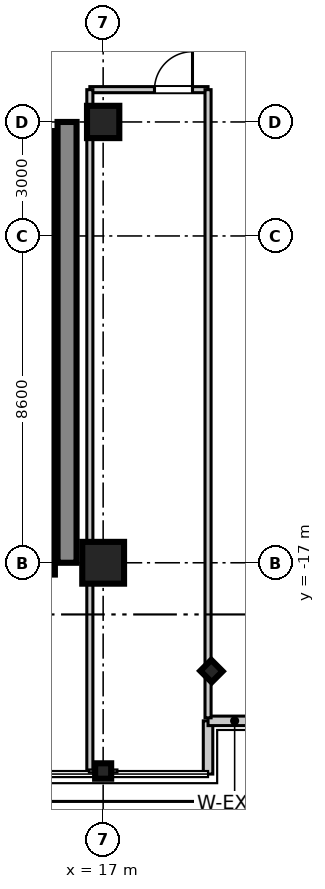
"""IFC4 building model, lengths in metres.
Left out: names, types, materials, properties, quantities, classifications, styles, units other than length and angle.
Written with IfcOpenShell. Run it as: python <this file> out.ifc"""

import sys

from ifc_helpers import new_model, si_unit, direction, frame, frame_2d, origin, origin_2d, place, context, subcontext, project, spatial, rectangle, i_section, extrude, source, transform, mapped, element, fill, save


model = new_model("IFC4")
c1 = context("Model", 3, precision=1e-05, world=origin(), true_north=direction((0.0, 1.0)))
c2 = subcontext(c1, "Body", "Model", "MODEL_VIEW")
j1 = project(units=[si_unit("LENGTHUNIT", "METRE"), si_unit("PLANEANGLEUNIT", "RADIAN")], contexts=[c1])
p1 = place(None, origin())
s1 = spatial("IfcSite", under=j1, at=p1, CompositionType="ELEMENT")
p2 = place(p1, origin())
s2 = spatial("IfcBuilding", under=s1, at=p2, CompositionType="ELEMENT")
p3 = place(p2, frame((0.0, 0.0, 149.0)))
s3 = spatial("IfcBuildingStorey", under=s2, at=p3, CompositionType="ELEMENT", Elevation=149.0)
m1 = source(origin(), c2, "Body", "SweptSolid", [
    extrude(rectangle(XDim=1.1, YDim=1.1, at=origin_2d()), origin(), (0.0, 0.0, 1.0), 3.605),
])
p4 = place(p3, frame((17.0, -17.0, 0.0), z_axis=(0.0, 0.0, 1.0), x_axis=(1.0, 0.0, 0.0)))
e1 = element("IfcColumn", 1, at=p4, inside=s3, PredefinedType="COLUMN", context=c2, shape_type="MappedRepresentation", body=[
    mapped(m1, transform((0.0, 0.0, 0.0), scale=1.0)),
])
m2 = source(origin(), c2, "Body", "SweptSolid", [
    extrude(rectangle(XDim=0.85, YDim=0.85, at=origin_2d()), origin(), (0.0, 0.0, 1.0), 3.605),
])
p5 = place(p3, frame((17.0, -5.4, 0.0), z_axis=(0.0, 0.0, 1.0), x_axis=(1.0, 0.0, 0.0)))
e2 = element("IfcColumn", 2, at=p5, inside=s3, PredefinedType="PILASTER", context=c2, shape_type="MappedRepresentation", body=[
    mapped(m2, transform((0.0, 0.0, 0.0), scale=1.0)),
])
m3 = source(origin(), c2, "Body", "SweptSolid", [
    extrude(i_section(OverallWidth=0.406, OverallDepth=0.422, WebThickness=0.019, FlangeThickness=0.03, at=origin_2d()), origin(), (0.0, 0.0, 1.0), 3.605),
])
for number, where, z_axis, x_axis in (
    (3, (17.0, -22.48, 0.0), (0.0, 0.0, 1.0), (0.0, 1.0, 0.0)),
    (4, (19.85, -19.85, 0.0), (0.0, 0.0, 1.0), (0.707, 0.707, 0.0)),
):
    element("IfcColumn", number, at=place(p3, frame(where, z_axis=z_axis, x_axis=x_axis)), inside=s3, PredefinedType="COLUMN", context=c2, shape_type="MappedRepresentation", body=[
        mapped(m3, transform((0.0, 0.0, 0.0), scale=1.0)),
    ])
m4 = source(origin(), c2, "Body", "SweptSolid", [
    extrude(rectangle(XDim=11.6, YDim=0.5, at=frame_2d((5.8, 0.0))), origin(), (0.0, 0.0, 1.0), 3.39),
])
p6 = place(p3, frame((16.05, -17.0, 0.0), z_axis=(0.0, 0.0, 1.0), x_axis=(0.0, 1.0, 0.0)))
e5 = element("IfcWall", 5, at=p6, inside=s3, PredefinedType="SHEAR", context=c2, shape_type="MappedRepresentation", body=[
    mapped(m4, transform((0.0, 0.0, 0.0), scale=1.0)),
])
m5 = source(origin(), c2, "Body", "SweptSolid", [
    extrude(rectangle(XDim=2.36, YDim=0.22, at=frame_2d((1.18, 0.0))), origin(), (0.0, 0.0, 1.0), 3.39),
])
p7 = place(p3, frame((15.62, -8.0, 0.0), z_axis=(0.0, 0.0, 1.0), x_axis=(0.0, 1.0, 0.0)))
e6 = element("IfcWall", 6, at=p7, inside=s3, PredefinedType="SHEAR", context=c2, shape_type="MappedRepresentation", body=[
    mapped(m5, transform((0.0, 0.0, 0.0), scale=1.0)),
])
m6 = source(origin(), c2, "Body", "SweptSolid", [
    extrude(rectangle(XDim=2.2, YDim=0.22, at=frame_2d((1.1, 0.0))), origin(), (0.0, 0.0, 1.0), 3.39),
])
for number, where, z_axis, x_axis in (
    (7, (15.62, -10.2, 0.0), (0.0, 0.0, 1.0), (0.0, 1.0, 0.0)),
    (8, (15.62, -12.4, 0.0), (0.0, 0.0, 1.0), (0.0, 1.0, 0.0)),
):
    element("IfcWall", number, at=place(p3, frame(where, z_axis=z_axis, x_axis=x_axis)), inside=s3, PredefinedType="SHEAR", context=c2, shape_type="MappedRepresentation", body=[
        mapped(m6, transform((0.0, 0.0, 0.0), scale=1.0)),
    ])
m7 = source(origin(), c2, "Body", "SweptSolid", [
    extrude(rectangle(XDim=2.3, YDim=0.22, at=frame_2d((1.15, 0.0))), origin(), (0.0, 0.0, 1.0), 3.39),
])
p8 = place(p3, frame((15.62, -14.7, 0.0), z_axis=(0.0, 0.0, 1.0), x_axis=(0.0, 1.0, 0.0)))
e9 = element("IfcWall", 9, at=p8, inside=s3, PredefinedType="SHEAR", context=c2, shape_type="MappedRepresentation", body=[
    mapped(m7, transform((0.0, 0.0, 0.0), scale=1.0)),
])
m8 = source(origin(), c2, "Body", "SweptSolid", [
    extrude(rectangle(XDim=2.61, YDim=0.22, at=frame_2d((1.305, 0.0))), origin(), (0.0, 0.0, 1.0), 3.39),
])
p9 = place(p3, frame((15.62, -17.31, 0.0), z_axis=(0.0, 0.0, 1.0), x_axis=(0.0, 1.0, 0.0)))
e10 = element("IfcWall", 10, at=p9, inside=s3, PredefinedType="SHEAR", context=c2, shape_type="MappedRepresentation", body=[
    mapped(m8, transform((0.0, 0.0, 0.0), scale=1.0)),
])
m9 = source(origin(), c2, "Body", "SweptSolid", [
    extrude(rectangle(XDim=1.4, YDim=0.25, at=frame_2d((0.7, 0.0))), origin(), (0.0, 0.0, 1.0), 3.39),
])
p10 = place(p3, frame((19.76, -22.56, 0.0), z_axis=(0.0, 0.0, 1.0), x_axis=(0.0, 1.0, 0.0)))
e11 = element("IfcWall", 11, at=p10, inside=s3, PredefinedType="STANDARD", context=c2, shape_type="MappedRepresentation", body=[
    mapped(m9, transform((0.0, 0.0, 0.0), scale=1.0)),
])
m10 = source(origin(), c2, "Body", "SweptSolid", [
    extrude(rectangle(XDim=1.4, YDim=0.25, at=frame_2d((0.7, 0.0))), origin(), (0.0, 0.0, 1.0), 3.39),
])
p11 = place(p3, frame((19.76, -21.16, 0.0), z_axis=(0.0, 0.0, 1.0), x_axis=(1.0, 0.0, 0.0)))
e12 = element("IfcWall", 12, at=p11, inside=s3, PredefinedType="STANDARD", context=c2, shape_type="MappedRepresentation", body=[
    mapped(m10, transform((0.0, 0.0, 0.0), scale=1.0)),
])
m11 = source(origin(), c2, "Body", "SweptSolid", [
    extrude(rectangle(XDim=3.11, YDim=0.16, at=frame_2d((1.555, 0.0))), origin(), (0.0, 0.0, 1.0), 2.73),
])
p12 = place(p3, frame((16.65, -4.55, 0.0), z_axis=(0.0, 0.0, 1.0), x_axis=(1.0, 0.0, 0.0)))
e13 = element("IfcWall", 13, at=p12, inside=s3, PredefinedType="PARTITIONING", context=c2, shape_type="MappedRepresentation", body=[
    mapped(m11, transform((0.0, 0.0, 0.0), scale=1.0)),
])
p13 = place(p12, frame((1.701, 0.0, 0.0)))
e14 = element("IfcOpeningElement", 14, at=p13, cuts=e13, PredefinedType="OPENING", context=c2, shape_type="SweptSolid", body=[
    extrude(rectangle(XDim=1.0, YDim=2.1, at=frame_2d((0.5, 1.05))), frame((0.0, 0.09, 0.0), z_axis=(0.0, -1.0, 0.0), x_axis=(1.0, 0.0, 0.0)), (0.0, 0.0, 1.0), 0.18),
])
m12 = source(origin(), c2, "Body", "SweptSolid", [
    extrude(rectangle(XDim=17.95, YDim=0.16, at=frame_2d((8.975, 0.0))), origin(), (0.0, 0.0, 1.0), 2.73),
])
p14 = place(p3, frame((16.65, -22.5, 0.0), z_axis=(0.0, 0.0, 1.0), x_axis=(0.0, 1.0, 0.0)))
e15 = element("IfcWall", 15, at=p14, inside=s3, PredefinedType="PARTITIONING", context=c2, shape_type="MappedRepresentation", body=[
    mapped(m12, transform((0.0, 0.0, 0.0), scale=1.0)),
])
m13 = source(origin(), c2, "Body", "SweptSolid", [
    extrude(rectangle(XDim=16.53, YDim=0.16, at=frame_2d((8.265, 0.0))), origin(), (0.0, 0.0, 1.0), 2.73),
])
p15 = place(p3, frame((19.76, -21.08, 0.0), z_axis=(0.0, 0.0, 1.0), x_axis=(0.0, 1.0, 0.0)))
e16 = element("IfcWall", 16, at=p15, inside=s3, PredefinedType="PARTITIONING", context=c2, shape_type="MappedRepresentation", body=[
    mapped(m13, transform((0.0, 0.0, 0.0), scale=1.0)),
])
m14 = source(origin(), c2, "Body", "SweptSolid", [
    extrude(rectangle(XDim=1.0, YDim=2.1, at=frame_2d((0.5, 1.05))), frame((0.0, 0.025, 0.0), z_axis=(0.0, -1.0, 0.0), x_axis=(1.0, 0.0, 0.0)), (0.0, 0.0, 1.0), 0.05),
])
p16 = place(p13, frame((1.0, 0.0, 0.0), z_axis=(0.0, 0.0, 1.0), x_axis=(-1.0, 0.0, 0.0)))
e17 = element("IfcDoor", 17, at=p16, inside=s3, OperationType="SINGLE_SWING_RIGHT", PredefinedType="DOOR", context=c2, shape_type="MappedRepresentation", body=[
    mapped(m14, transform((0.0, 0.0, 0.0), scale=1.0)),
])
fill(e14, e17)
save(model, sys.argv[1])
